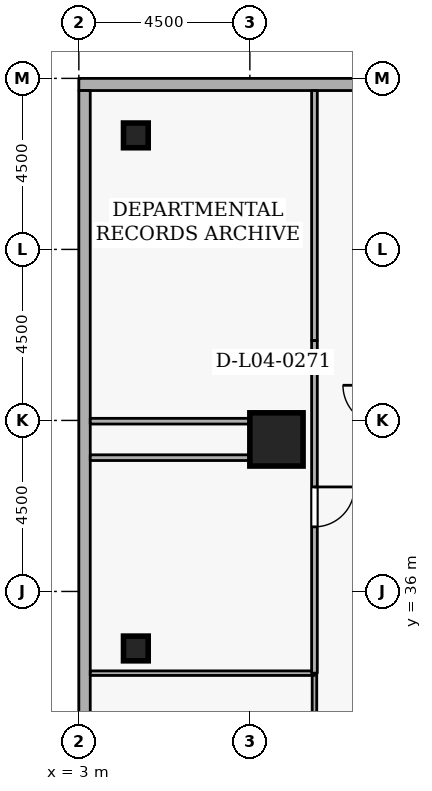
"""IFC4 building model, lengths in metres.
Left out: names, types, materials, properties, quantities, classifications, styles, units other than length and angle.
Written with IfcOpenShell. Run it as: python <this file> out.ifc"""

import sys

from ifc_helpers import new_model, si_unit, direction, frame, frame_2d, origin, origin_2d, place, context, subcontext, project, spatial, rectangle, extrude, element, fill, save


model = new_model("IFC4")
c1 = context("Model", 3, precision=1e-05, world=origin(), true_north=direction((0.0, 1.0)))
c2 = subcontext(c1, "Body", "Model", "MODEL_VIEW")
j1 = project(units=[si_unit("LENGTHUNIT", "METRE"), si_unit("PLANEANGLEUNIT", "RADIAN")], contexts=[c1])
p1 = place(None, origin())
s1 = spatial("IfcSite", under=j1, at=p1, CompositionType="ELEMENT")
p2 = place(p1, origin())
s2 = spatial("IfcBuilding", under=s1, at=p2, CompositionType="ELEMENT")
p3 = place(p2, frame((0.0, 0.0, 18.6)))
s3 = spatial("IfcBuildingStorey", under=s2, at=p3, CompositionType="ELEMENT", Elevation=18.6)
p4 = place(p3, frame((8.2, 40.0, 0.0), z_axis=(0.0, 0.0, 1.0), x_axis=(1.0, 0.0, 0.0)))
e1 = element("IfcColumn", 1, at=p4, inside=s3, PredefinedType="COLUMN", context=c2, shape_type="SweptSolid", body=[
    extrude(rectangle(XDim=1.4, YDim=1.4, at=origin_2d()), origin(), (0.0, 0.0, 1.0), 4.5),
])
for number, where, z_axis, x_axis in (
    (2, (4.5, 34.5, 0.0), (0.0, 0.0, 1.0), (1.0, 0.0, 0.0)),
    (3, (4.5, 48.0, 0.0), (0.0, 0.0, 1.0), (1.0, 0.0, 0.0)),
):
    element("IfcColumn", number, at=place(p3, frame(where, z_axis=z_axis, x_axis=x_axis)), inside=s3, PredefinedType="COLUMN", context=c2, shape_type="SweptSolid", body=[
        extrude(rectangle(XDim=0.65, YDim=0.65, at=origin_2d()), origin(), (0.0, 0.0, 1.0), 4.5),
    ])
p5 = place(p3, frame((42.4, 49.34, 0.0), z_axis=(0.0, 0.0, 1.0), x_axis=(-1.0, 0.0, 0.0)))
e4 = element("IfcWall", 4, at=p5, inside=s3, PredefinedType="STANDARD", context=c2, shape_type="SweptSolid", body=[
    extrude(rectangle(XDim=39.4, YDim=0.32, at=frame_2d((19.7, 0.0))), origin(), (0.0, 0.0, 1.0), 3.56),
])
p6 = place(p5, frame((12.8, 0.0, 0.78)))
e5 = element("IfcOpeningElement", 5, at=p6, cuts=e4, PredefinedType="OPENING", context=c2, shape_type="SweptSolid", body=[
    extrude(rectangle(XDim=1.8, YDim=2.15, at=frame_2d((0.9, 1.075))), frame((0.0, 0.17, 0.0), z_axis=(0.0, -1.0, 0.0), x_axis=(1.0, 0.0, 0.0)), (0.0, 0.0, 1.0), 0.34),
])
p7 = place(p5, frame((22.8, 0.0, 0.78)))
e6 = element("IfcOpeningElement", 6, at=p7, cuts=e4, PredefinedType="OPENING", context=c2, shape_type="SweptSolid", body=[
    extrude(rectangle(XDim=1.8, YDim=2.15, at=frame_2d((0.9, 1.075))), frame((0.0, 0.17, 0.0), z_axis=(0.0, -1.0, 0.0), x_axis=(1.0, 0.0, 0.0)), (0.0, 0.0, 1.0), 0.34),
])
p8 = place(p3, frame((3.15, 49.18, 0.0), z_axis=(0.0, 0.0, 1.0), x_axis=(0.0, -1.0, 0.0)))
e7 = element("IfcWall", 7, at=p8, inside=s3, PredefinedType="STANDARD", context=c2, shape_type="SweptSolid", body=[
    extrude(rectangle(XDim=38.36, YDim=0.3, at=frame_2d((19.18, 0.0))), origin(), (0.0, 0.0, 1.0), 3.56),
])
p9 = place(p3, frame((9.2, 33.85, 0.0), z_axis=(0.0, 0.0, 1.0), x_axis=(0.0, -1.0, 0.0)))
e8 = element("IfcWall", 8, at=p9, inside=s3, PredefinedType="PARTITIONING", context=c2, shape_type="SweptSolid", body=[
    extrude(rectangle(XDim=12.45, YDim=0.12, at=frame_2d((6.225, 0.0))), origin(), (0.0, 0.0, 1.0), 4.16),
])
p10 = place(p9, frame((4.6, 0.0, 0.0)))
e9 = element("IfcOpeningElement", 9, at=p10, cuts=e8, PredefinedType="OPENING", context=c2, shape_type="SweptSolid", body=[
    extrude(rectangle(XDim=1.05, YDim=2.1, at=frame_2d((0.525, 1.05))), frame((0.0, 0.07, 0.0), z_axis=(0.0, -1.0, 0.0), x_axis=(1.0, 0.0, 0.0)), (0.0, 0.0, 1.0), 0.14),
])
p11 = place(p3, frame((3.3, 33.85, 0.0), z_axis=(0.0, 0.0, 1.0), x_axis=(1.0, 0.0, 0.0)))
e10 = element("IfcWall", 10, at=p11, inside=s3, PredefinedType="PARTITIONING", context=c2, shape_type="SweptSolid", body=[
    extrude(rectangle(XDim=5.9, YDim=0.12, at=frame_2d((2.95, 0.0))), origin(), (0.0, 0.0, 1.0), 4.16),
])
p12 = place(p3, frame((9.2, 49.18, 0.0), z_axis=(0.0, 0.0, 1.0), x_axis=(0.0, -1.0, 0.0)))
e11 = element("IfcWall", 11, at=p12, inside=s3, PredefinedType="PARTITIONING", context=c2, shape_type="SweptSolid", body=[
    extrude(rectangle(XDim=6.58, YDim=0.15, at=frame_2d((3.29, 0.0))), origin(), (0.0, 0.0, 1.0), 4.16),
])
p13 = place(p3, frame((9.2, 42.6, 0.0), z_axis=(0.0, 0.0, 1.0), x_axis=(0.0, -1.0, 0.0)))
e12 = element("IfcWall", 12, at=p13, inside=s3, PredefinedType="PARTITIONING", context=c2, shape_type="SweptSolid", body=[
    extrude(rectangle(XDim=8.75, YDim=0.15, at=frame_2d((4.375, 0.0))), origin(), (0.0, 0.0, 1.0), 4.16),
])
p14 = place(p13, frame((3.85, 0.0, 0.0)))
e13 = element("IfcOpeningElement", 13, at=p14, cuts=e12, PredefinedType="OPENING", context=c2, shape_type="SweptSolid", body=[
    extrude(rectangle(XDim=1.05, YDim=2.1, at=frame_2d((0.525, 1.05))), frame((0.0, 0.085, 0.0), z_axis=(0.0, -1.0, 0.0), x_axis=(1.0, 0.0, 0.0)), (0.0, 0.0, 1.0), 0.17),
])
for number, where, z_axis, x_axis in (
    (14, (3.3, 39.52, 0.0), (0.0, 0.0, 1.0), (1.0, 0.0, 0.0)),
    (15, (8.2, 40.48, 0.0), (0.0, 0.0, 1.0), (-1.0, 0.0, 0.0)),
):
    element("IfcWall", number, at=place(p3, frame(where, z_axis=z_axis, x_axis=x_axis)), inside=s3, PredefinedType="PARTITIONING", context=c2, shape_type="SweptSolid", body=[
        extrude(rectangle(XDim=4.9, YDim=0.15, at=frame_2d((2.45, 0.0))), origin(), (0.0, 0.0, 1.0), 4.16),
    ])
p15 = place(p14, origin())
e16 = element("IfcDoor", 16, at=p15, inside=s3, OperationType="SINGLE_SWING_LEFT", PredefinedType="DOOR", context=c2, shape_type="SweptSolid", body=[
    extrude(rectangle(XDim=1.05, YDim=2.1, at=frame_2d((0.525, 1.05))), frame((0.0, 0.025, 0.0), z_axis=(0.0, -1.0, 0.0), x_axis=(1.0, 0.0, 0.0)), (0.0, 0.0, 1.0), 0.05),
])
fill(e13, e16)
save(model, sys.argv[1])
